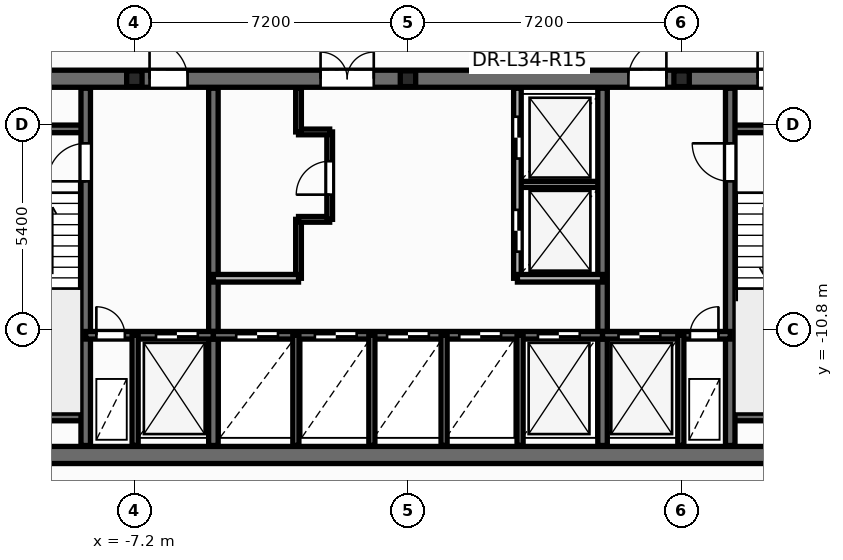
"""IFC4 building model, lengths in metres.
Left out: names, types, materials, properties, quantities, classifications, styles, units other than length and angle.
Written with IfcOpenShell. Run it as: python <this file> out.ifc"""

import sys

from ifc_helpers import new_model, si_unit, direction, frame, frame_2d, origin, origin_2d, place, context, subcontext, project, spatial, rectangle, i_section, extrude, element, fill, save


model = new_model("IFC4")
c1 = context("Model", 3, precision=1e-05, world=origin(), true_north=direction((0.0, 1.0)))
c2 = subcontext(c1, "Body", "Model", "MODEL_VIEW")
j1 = project(units=[si_unit("LENGTHUNIT", "METRE"), si_unit("PLANEANGLEUNIT", "RADIAN")], contexts=[c1])
p1 = place(None, origin())
s1 = spatial("IfcSite", under=j1, at=p1, CompositionType="ELEMENT")
p2 = place(p1, origin())
s2 = spatial("IfcBuilding", under=s1, at=p2, CompositionType="ELEMENT")
p3 = place(p2, frame((0.0, 0.0, 132.9)))
s3 = spatial("IfcBuildingStorey", under=s2, at=p3, CompositionType="ELEMENT", Elevation=132.9)
for number, where, z_axis, x_axis in (
    (1, (-7.2, -4.2, 0.0), (0.0, 0.0, 1.0), (1.0, 0.0, 0.0)),
    (2, (0.0, -4.2, 0.0), (0.0, 0.0, 1.0), (1.0, 0.0, 0.0)),
    (3, (7.2, -4.2, 0.0), (0.0, 0.0, 1.0), (1.0, 0.0, 0.0)),
):
    element("IfcColumn", number, at=place(p3, frame(where, z_axis=z_axis, x_axis=x_axis)), inside=s3, PredefinedType="PILASTER", context=c2, shape_type="SweptSolid", body=[
        extrude(i_section(OverallWidth=0.405, OverallDepth=0.414, WebThickness=0.022, FlangeThickness=0.032, at=origin_2d()), origin(), (0.0, 0.0, 1.0), 3.6),
    ])
p4 = place(p3, frame((-2.88, -9.45, 0.0), z_axis=(0.0, 0.0, 1.0), x_axis=(0.0, 1.0, 0.0)))
e4 = element("IfcWall", 4, at=p4, inside=s3, PredefinedType="PARTITIONING", context=c2, shape_type="SweptSolid", body=[
    extrude(rectangle(XDim=1.55, YDim=0.15, at=frame_2d((0.775, 0.0))), origin(), (0.0, 0.0, 1.0), 3.35),
])
p5 = place(p3, frame((-2.88, -7.9, 0.0), z_axis=(0.0, 0.0, 1.0), x_axis=(1.0, 0.0, 0.0)))
e5 = element("IfcWall", 5, at=p5, inside=s3, PredefinedType="PARTITIONING", context=c2, shape_type="SweptSolid", body=[
    extrude(rectangle(XDim=0.82, YDim=0.15, at=frame_2d((0.41, 0.0))), origin(), (0.0, 0.0, 1.0), 3.35),
])
p6 = place(p3, frame((-2.06, -7.9, 0.0), z_axis=(0.0, 0.0, 1.0), x_axis=(0.0, 1.0, 0.0)))
e6 = element("IfcWall", 6, at=p6, inside=s3, PredefinedType="PARTITIONING", context=c2, shape_type="SweptSolid", body=[
    extrude(rectangle(XDim=2.3, YDim=0.15, at=frame_2d((1.15, 0.0))), origin(), (0.0, 0.0, 1.0), 3.35),
])
p7 = place(p6, frame((0.65, 0.0, 0.0)))
e7 = element("IfcOpeningElement", 7, at=p7, cuts=e6, PredefinedType="OPENING", context=c2, shape_type="SweptSolid", body=[
    extrude(rectangle(XDim=0.886, YDim=2.104, at=frame_2d((0.44, 1.052))), frame((0.0, 0.085, 0.0), z_axis=(0.0, -1.0, 0.0), x_axis=(1.0, 0.0, 0.0)), (0.0, 0.0, 1.0), 0.17),
])
p8 = place(p3, frame((-2.88, -5.6, 0.0), z_axis=(0.0, 0.0, 1.0), x_axis=(1.0, 0.0, 0.0)))
e8 = element("IfcWall", 8, at=p8, inside=s3, PredefinedType="PARTITIONING", context=c2, shape_type="SweptSolid", body=[
    extrude(rectangle(XDim=0.82, YDim=0.15, at=frame_2d((0.41, 0.0))), origin(), (0.0, 0.0, 1.0), 3.35),
])
p9 = place(p3, frame((-2.88, -5.6, 0.0), z_axis=(0.0, 0.0, 1.0), x_axis=(0.0, 1.0, 0.0)))
e9 = element("IfcWall", 9, at=p9, inside=s3, PredefinedType="PARTITIONING", context=c2, shape_type="SweptSolid", body=[
    extrude(rectangle(XDim=1.15, YDim=0.15, at=frame_2d((0.575, 0.0))), origin(), (0.0, 0.0, 1.0), 3.35),
])
p10 = place(p3, frame((2.88, -6.98, 0.0), z_axis=(0.0, 0.0, 1.0), x_axis=(1.0, 0.0, 0.0)))
e10 = element("IfcWall", 10, at=p10, inside=s3, PredefinedType="PARTITIONING", context=c2, shape_type="SweptSolid", body=[
    extrude(rectangle(XDim=2.24, YDim=0.16, at=frame_2d((1.12, 0.0))), origin(), (0.0, 0.0, 1.0), 3.35),
])
p11 = place(p3, frame((-12.65, -14.1, 0.0), z_axis=(0.0, 0.0, 1.0), x_axis=(1.0, 0.0, 0.0)))
e11 = element("IfcWall", 11, at=p11, inside=s3, PredefinedType="SHEAR", context=c2, shape_type="SweptSolid", body=[
    extrude(rectangle(XDim=25.3, YDim=0.45, at=frame_2d((12.65, 0.0))), origin(), (0.0, 0.0, 1.0), 3.6),
])
p12 = place(p3, frame((-12.65, -4.2, 0.0), z_axis=(0.0, 0.0, 1.0), x_axis=(1.0, 0.0, 0.0)))
e12 = element("IfcWall", 12, at=p12, inside=s3, PredefinedType="SHEAR", context=c2, shape_type="SweptSolid", body=[
    extrude(rectangle(XDim=25.3, YDim=0.45, at=frame_2d((12.65, 0.0))), origin(), (0.0, 0.0, 1.0), 3.6),
])
p13 = place(p12, frame((1.85, 0.0, 0.0)))
e13 = element("IfcOpeningElement", 13, at=p13, cuts=e12, PredefinedType="OPENING", context=c2, shape_type="SweptSolid", body=[
    extrude(rectangle(XDim=0.756, YDim=2.054, at=frame_2d((0.375, 1.027))), frame((0.0, 0.235, 0.0), z_axis=(0.0, -1.0, 0.0), x_axis=(1.0, 0.0, 0.0)), (0.0, 0.0, 1.0), 0.47),
])
p14 = place(p12, frame((21.85, 0.0, 0.0)))
e14 = element("IfcOpeningElement", 14, at=p14, cuts=e12, PredefinedType="OPENING", context=c2, shape_type="SweptSolid", body=[
    extrude(rectangle(XDim=0.756, YDim=2.054, at=frame_2d((0.375, 1.027))), frame((0.0, 0.235, 0.0), z_axis=(0.0, -1.0, 0.0), x_axis=(1.0, 0.0, 0.0)), (0.0, 0.0, 1.0), 0.47),
])
p15 = place(p12, frame((23.5, 0.0, 0.0)))
e15 = element("IfcOpeningElement", 15, at=p15, cuts=e12, PredefinedType="OPENING", context=c2, shape_type="SweptSolid", body=[
    extrude(rectangle(XDim=0.756, YDim=2.054, at=frame_2d((0.375, 1.027))), frame((0.0, 0.235, 0.0), z_axis=(0.0, -1.0, 0.0), x_axis=(1.0, 0.0, 0.0)), (0.0, 0.0, 1.0), 0.47),
])
p16 = place(p12, frame((5.85, 0.0, 0.0)))
e16 = element("IfcOpeningElement", 16, at=p16, cuts=e12, PredefinedType="OPENING", context=c2, shape_type="SweptSolid", body=[
    extrude(rectangle(XDim=1.006, YDim=2.104, at=frame_2d((0.5, 1.052))), frame((0.0, 0.235, 0.0), z_axis=(0.0, -1.0, 0.0), x_axis=(1.0, 0.0, 0.0)), (0.0, 0.0, 1.0), 0.47),
])
p17 = place(p12, frame((10.35, 0.0, 0.0)))
e17 = element("IfcOpeningElement", 17, at=p17, cuts=e12, PredefinedType="OPENING", context=c2, shape_type="SweptSolid", body=[
    extrude(rectangle(XDim=1.406, YDim=2.154, at=frame_2d((0.7, 1.077))), frame((0.0, 0.235, 0.0), z_axis=(0.0, -1.0, 0.0), x_axis=(1.0, 0.0, 0.0)), (0.0, 0.0, 1.0), 0.47),
])
p18 = place(p12, frame((18.45, 0.0, 0.0)))
e18 = element("IfcOpeningElement", 18, at=p18, cuts=e12, PredefinedType="OPENING", context=c2, shape_type="SweptSolid", body=[
    extrude(rectangle(XDim=1.006, YDim=2.104, at=frame_2d((0.5, 1.052))), frame((0.0, 0.235, 0.0), z_axis=(0.0, -1.0, 0.0), x_axis=(1.0, 0.0, 0.0)), (0.0, 0.0, 1.0), 0.47),
])
for number, where, z_axis, x_axis in (
    (19, (-12.35, -5.52, 0.0), (0.0, 0.0, 1.0), (1.0, 0.0, 0.0)),
    (20, (-12.35, -13.1, 0.0), (0.0, 0.0, 1.0), (1.0, 0.0, 0.0)),
    (21, (8.48, -5.52, 0.0), (0.0, 0.0, 1.0), (1.0, 0.0, 0.0)),
    (22, (8.48, -13.1, 0.0), (0.0, 0.0, 1.0), (1.0, 0.0, 0.0)),
):
    element("IfcWall", number, at=place(p3, frame(where, z_axis=z_axis, x_axis=x_axis)), inside=s3, PredefinedType="SOLIDWALL", context=c2, shape_type="SweptSolid", body=[
        extrude(rectangle(XDim=3.87, YDim=0.2, at=frame_2d((1.935, 0.0))), origin(), (0.0, 0.0, 1.0), 3.6),
    ])
p19 = place(p3, frame((-8.48, -13.85, 0.0), z_axis=(0.0, 0.0, 1.0), x_axis=(0.0, 1.0, 0.0)))
e23 = element("IfcWall", 23, at=p19, inside=s3, PredefinedType="SHEAR", context=c2, shape_type="SweptSolid", body=[
    extrude(rectangle(XDim=9.4, YDim=0.25, at=frame_2d((4.7, 0.0))), origin(), (0.0, 0.0, 1.0), 3.6),
])
p20 = place(p19, frame((6.95, 0.0, 0.0)))
e24 = element("IfcOpeningElement", 24, at=p20, cuts=e23, PredefinedType="OPENING", context=c2, shape_type="SweptSolid", body=[
    extrude(rectangle(XDim=1.006, YDim=2.104, at=frame_2d((0.5, 1.052))), frame((0.0, 0.135, 0.0), z_axis=(0.0, -1.0, 0.0), x_axis=(1.0, 0.0, 0.0)), (0.0, 0.0, 1.0), 0.27),
])
p21 = place(p3, frame((8.48, -13.85, 0.0), z_axis=(0.0, 0.0, 1.0), x_axis=(0.0, 1.0, 0.0)))
e25 = element("IfcWall", 25, at=p21, inside=s3, PredefinedType="SHEAR", context=c2, shape_type="SweptSolid", body=[
    extrude(rectangle(XDim=9.4, YDim=0.25, at=frame_2d((4.7, 0.0))), origin(), (0.0, 0.0, 1.0), 3.6),
])
p22 = place(p21, frame((6.95, 0.0, 0.0)))
e26 = element("IfcOpeningElement", 26, at=p22, cuts=e25, PredefinedType="OPENING", context=c2, shape_type="SweptSolid", body=[
    extrude(rectangle(XDim=1.006, YDim=2.104, at=frame_2d((0.5, 1.052))), frame((0.0, 0.135, 0.0), z_axis=(0.0, -1.0, 0.0), x_axis=(1.0, 0.0, 0.0)), (0.0, 0.0, 1.0), 0.27),
])
for number, where, z_axis, x_axis in (
    (27, (-5.12, -13.85, 0.0), (0.0, 0.0, 1.0), (0.0, 1.0, 0.0)),
    (28, (5.12, -13.85, 0.0), (0.0, 0.0, 1.0), (0.0, 1.0, 0.0)),
):
    element("IfcWall", number, at=place(p3, frame(where, z_axis=z_axis, x_axis=x_axis)), inside=s3, PredefinedType="SHEAR", context=c2, shape_type="SweptSolid", body=[
        extrude(rectangle(XDim=9.4, YDim=0.25, at=frame_2d((4.7, 0.0))), origin(), (0.0, 0.0, 1.0), 3.6),
    ])
p23 = place(p3, frame((-8.48, -10.95, 0.0), z_axis=(0.0, 0.0, 1.0), x_axis=(1.0, 0.0, 0.0)))
e29 = element("IfcWall", 29, at=p23, inside=s3, PredefinedType="SOLIDWALL", context=c2, shape_type="SweptSolid", body=[
    extrude(rectangle(XDim=3.36, YDim=0.2, at=frame_2d((1.68, 0.0))), origin(), (0.0, 0.0, 1.0), 3.6),
])
p24 = place(p23, frame((0.28, 0.0, 0.0)))
e30 = element("IfcOpeningElement", 30, at=p24, cuts=e29, PredefinedType="OPENING", context=c2, shape_type="SweptSolid", body=[
    extrude(rectangle(XDim=0.756, YDim=2.054, at=frame_2d((0.375, 1.027))), frame((0.0, 0.11, 0.0), z_axis=(0.0, -1.0, 0.0), x_axis=(1.0, 0.0, 0.0)), (0.0, 0.0, 1.0), 0.22),
])
p25 = place(p23, frame((1.85, 0.0, 0.0)))
e31 = element("IfcOpeningElement", 31, at=p25, cuts=e29, PredefinedType="OPENING", context=c2, shape_type="SweptSolid", body=[
    extrude(rectangle(XDim=1.106, YDim=2.104, at=frame_2d((0.55, 1.052))), frame((0.0, 0.11, 0.0), z_axis=(0.0, -1.0, 0.0), x_axis=(1.0, 0.0, 0.0)), (0.0, 0.0, 1.0), 0.22),
])
p26 = place(p3, frame((-5.12, -10.95, 0.0), z_axis=(0.0, 0.0, 1.0), x_axis=(1.0, 0.0, 0.0)))
e32 = element("IfcWall", 32, at=p26, inside=s3, PredefinedType="SOLIDWALL", context=c2, shape_type="SweptSolid", body=[
    extrude(rectangle(XDim=10.24, YDim=0.2, at=frame_2d((5.12, 0.0))), origin(), (0.0, 0.0, 1.0), 3.6),
])
p27 = place(p26, frame((0.6, 0.0, 0.0)))
e33 = element("IfcOpeningElement", 33, at=p27, cuts=e32, PredefinedType="OPENING", context=c2, shape_type="SweptSolid", body=[
    extrude(rectangle(XDim=1.106, YDim=2.104, at=frame_2d((0.55, 1.052))), frame((0.0, 0.11, 0.0), z_axis=(0.0, -1.0, 0.0), x_axis=(1.0, 0.0, 0.0)), (0.0, 0.0, 1.0), 0.22),
])
p28 = place(p26, frame((2.67, 0.0, 0.0)))
e34 = element("IfcOpeningElement", 34, at=p28, cuts=e32, PredefinedType="OPENING", context=c2, shape_type="SweptSolid", body=[
    extrude(rectangle(XDim=1.106, YDim=2.104, at=frame_2d((0.55, 1.052))), frame((0.0, 0.11, 0.0), z_axis=(0.0, -1.0, 0.0), x_axis=(1.0, 0.0, 0.0)), (0.0, 0.0, 1.0), 0.22),
])
p29 = place(p26, frame((4.57, 0.0, 0.0)))
e35 = element("IfcOpeningElement", 35, at=p29, cuts=e32, PredefinedType="OPENING", context=c2, shape_type="SweptSolid", body=[
    extrude(rectangle(XDim=1.106, YDim=2.104, at=frame_2d((0.55, 1.052))), frame((0.0, 0.11, 0.0), z_axis=(0.0, -1.0, 0.0), x_axis=(1.0, 0.0, 0.0)), (0.0, 0.0, 1.0), 0.22),
])
p30 = place(p26, frame((6.47, 0.0, 0.0)))
e36 = element("IfcOpeningElement", 36, at=p30, cuts=e32, PredefinedType="OPENING", context=c2, shape_type="SweptSolid", body=[
    extrude(rectangle(XDim=1.106, YDim=2.104, at=frame_2d((0.55, 1.052))), frame((0.0, 0.11, 0.0), z_axis=(0.0, -1.0, 0.0), x_axis=(1.0, 0.0, 0.0)), (0.0, 0.0, 1.0), 0.22),
])
p31 = place(p26, frame((8.54, 0.0, 0.0)))
e37 = element("IfcOpeningElement", 37, at=p31, cuts=e32, PredefinedType="OPENING", context=c2, shape_type="SweptSolid", body=[
    extrude(rectangle(XDim=1.106, YDim=2.104, at=frame_2d((0.55, 1.052))), frame((0.0, 0.11, 0.0), z_axis=(0.0, -1.0, 0.0), x_axis=(1.0, 0.0, 0.0)), (0.0, 0.0, 1.0), 0.22),
])
p32 = place(p3, frame((5.12, -10.95, 0.0), z_axis=(0.0, 0.0, 1.0), x_axis=(1.0, 0.0, 0.0)))
e38 = element("IfcWall", 38, at=p32, inside=s3, PredefinedType="SOLIDWALL", context=c2, shape_type="SweptSolid", body=[
    extrude(rectangle(XDim=3.36, YDim=0.2, at=frame_2d((1.68, 0.0))), origin(), (0.0, 0.0, 1.0), 3.6),
])
p33 = place(p32, frame((0.42, 0.0, 0.0)))
e39 = element("IfcOpeningElement", 39, at=p33, cuts=e38, PredefinedType="OPENING", context=c2, shape_type="SweptSolid", body=[
    extrude(rectangle(XDim=1.106, YDim=2.104, at=frame_2d((0.55, 1.052))), frame((0.0, 0.11, 0.0), z_axis=(0.0, -1.0, 0.0), x_axis=(1.0, 0.0, 0.0)), (0.0, 0.0, 1.0), 0.22),
])
p34 = place(p32, frame((2.3, 0.0, 0.0)))
e40 = element("IfcOpeningElement", 40, at=p34, cuts=e38, PredefinedType="OPENING", context=c2, shape_type="SweptSolid", body=[
    extrude(rectangle(XDim=0.756, YDim=2.054, at=frame_2d((0.375, 1.027))), frame((0.0, 0.11, 0.0), z_axis=(0.0, -1.0, 0.0), x_axis=(1.0, 0.0, 0.0)), (0.0, 0.0, 1.0), 0.22),
])
for number, where, z_axis, x_axis in (
    (41, (-7.18, -13.85, 0.0), (0.0, 0.0, 1.0), (0.0, 1.0, 0.0)),
    (42, (7.18, -13.85, 0.0), (0.0, 0.0, 1.0), (0.0, 1.0, 0.0)),
    (43, (-2.95, -13.85, 0.0), (0.0, 0.0, 1.0), (0.0, 1.0, 0.0)),
    (44, (2.95, -13.85, 0.0), (0.0, 0.0, 1.0), (0.0, 1.0, 0.0)),
):
    element("IfcWall", number, at=place(p3, frame(where, z_axis=z_axis, x_axis=x_axis)), inside=s3, PredefinedType="PARTITIONING", context=c2, shape_type="SweptSolid", body=[
        extrude(rectangle(XDim=2.9, YDim=0.16, at=frame_2d((1.45, 0.0))), origin(), (0.0, 0.0, 1.0), 2.475),
    ])
p35 = place(p3, frame((-5.12, -9.45, 0.0), z_axis=(0.0, 0.0, 1.0), x_axis=(1.0, 0.0, 0.0)))
e45 = element("IfcWall", 45, at=p35, inside=s3, PredefinedType="SOLIDWALL", context=c2, shape_type="SweptSolid", body=[
    extrude(rectangle(XDim=2.24, YDim=0.2, at=frame_2d((1.12, 0.0))), origin(), (0.0, 0.0, 1.0), 3.35),
])
p36 = place(p3, frame((2.88, -9.45, 0.0), z_axis=(0.0, 0.0, 1.0), x_axis=(0.0, 1.0, 0.0)))
e46 = element("IfcWall", 46, at=p36, inside=s3, PredefinedType="SOLIDWALL", context=c2, shape_type="SweptSolid", body=[
    extrude(rectangle(XDim=5.0, YDim=0.2, at=frame_2d((2.5, 0.0))), origin(), (0.0, 0.0, 1.0), 3.35),
])
p37 = place(p36, frame((0.7, 0.0, 0.0)))
e47 = element("IfcOpeningElement", 47, at=p37, cuts=e46, PredefinedType="OPENING", context=c2, shape_type="SweptSolid", body=[
    extrude(rectangle(XDim=1.106, YDim=2.104, at=frame_2d((0.55, 1.052))), frame((0.0, 0.11, 0.0), z_axis=(0.0, -1.0, 0.0), x_axis=(1.0, 0.0, 0.0)), (0.0, 0.0, 1.0), 0.22),
])
p38 = place(p36, frame((3.15, 0.0, 0.0)))
e48 = element("IfcOpeningElement", 48, at=p38, cuts=e46, PredefinedType="OPENING", context=c2, shape_type="SweptSolid", body=[
    extrude(rectangle(XDim=1.106, YDim=2.104, at=frame_2d((0.55, 1.052))), frame((0.0, 0.11, 0.0), z_axis=(0.0, -1.0, 0.0), x_axis=(1.0, 0.0, 0.0)), (0.0, 0.0, 1.0), 0.22),
])
p39 = place(p3, frame((2.88, -9.45, 0.0), z_axis=(0.0, 0.0, 1.0), x_axis=(1.0, 0.0, 0.0)))
e49 = element("IfcWall", 49, at=p39, inside=s3, PredefinedType="SOLIDWALL", context=c2, shape_type="SweptSolid", body=[
    extrude(rectangle(XDim=2.24, YDim=0.2, at=frame_2d((1.12, 0.0))), origin(), (0.0, 0.0, 1.0), 3.35),
])
for number, where, z_axis, x_axis in (
    (50, (-0.95, -13.85, 0.0), (0.0, 0.0, 1.0), (0.0, 1.0, 0.0)),
    (51, (0.95, -13.85, 0.0), (0.0, 0.0, 1.0), (0.0, 1.0, 0.0)),
):
    element("IfcWall", number, at=place(p3, frame(where, z_axis=z_axis, x_axis=x_axis)), inside=s3, PredefinedType="PARTITIONING", context=c2, shape_type="SweptSolid", body=[
        extrude(rectangle(XDim=2.9, YDim=0.16, at=frame_2d((1.45, 0.0))), origin(), (0.0, 0.0, 1.0), 2.475),
    ])
p40 = place(p7, origin())
e52 = element("IfcDoor", 52, at=p40, inside=s3, OperationType="SINGLE_SWING_LEFT", PredefinedType="DOOR", context=c2, shape_type="SweptSolid", body=[
    extrude(rectangle(XDim=0.88, YDim=2.1, at=frame_2d((0.44, 1.05))), frame((0.0, 0.025, 0.0), z_axis=(0.0, -1.0, 0.0), x_axis=(1.0, 0.0, 0.0)), (0.0, 0.0, 1.0), 0.05),
])
fill(e7, e52)
p41 = place(p37, origin())
e53 = element("IfcDoor", 53, at=p41, inside=s3, OperationType="DOUBLE_DOOR_SLIDING", PredefinedType="DOOR", context=c2, shape_type="SweptSolid", body=[
    extrude(rectangle(XDim=1.1, YDim=2.1, at=frame_2d((0.55, 1.05))), frame((0.0, 0.025, 0.0), z_axis=(0.0, -1.0, 0.0), x_axis=(1.0, 0.0, 0.0)), (0.0, 0.0, 1.0), 0.05),
])
fill(e47, e53)
p42 = place(p38, origin())
e54 = element("IfcDoor", 54, at=p42, inside=s3, OperationType="DOUBLE_DOOR_SLIDING", PredefinedType="DOOR", context=c2, shape_type="SweptSolid", body=[
    extrude(rectangle(XDim=1.1, YDim=2.1, at=frame_2d((0.55, 1.05))), frame((0.0, 0.025, 0.0), z_axis=(0.0, -1.0, 0.0), x_axis=(1.0, 0.0, 0.0)), (0.0, 0.0, 1.0), 0.05),
])
fill(e48, e54)
p43 = place(p20, origin())
e55 = element("IfcDoor", 55, at=p43, inside=s3, OperationType="SINGLE_SWING_LEFT", PredefinedType="DOOR", context=c2, shape_type="SweptSolid", body=[
    extrude(rectangle(XDim=1.0, YDim=2.1, at=frame_2d((0.5, 1.05))), frame((0.0, 0.025, 0.0), z_axis=(0.0, -1.0, 0.0), x_axis=(1.0, 0.0, 0.0)), (0.0, 0.0, 1.0), 0.05),
])
fill(e24, e55)
p44 = place(p22, origin())
e56 = element("IfcDoor", 56, at=p44, inside=s3, OperationType="SINGLE_SWING_RIGHT", PredefinedType="DOOR", context=c2, shape_type="SweptSolid", body=[
    extrude(rectangle(XDim=1.0, YDim=2.1, at=frame_2d((0.5, 1.05))), frame((0.0, 0.025, 0.0), z_axis=(0.0, -1.0, 0.0), x_axis=(1.0, 0.0, 0.0)), (0.0, 0.0, 1.0), 0.05),
])
fill(e26, e56)
p45 = place(p24, origin())
e57 = element("IfcDoor", 57, at=p45, inside=s3, OperationType="SINGLE_SWING_LEFT", PredefinedType="DOOR", context=c2, shape_type="SweptSolid", body=[
    extrude(rectangle(XDim=0.75, YDim=2.05, at=frame_2d((0.375, 1.025))), frame((0.0, 0.025, 0.0), z_axis=(0.0, -1.0, 0.0), x_axis=(1.0, 0.0, 0.0)), (0.0, 0.0, 1.0), 0.05),
])
fill(e30, e57)
p46 = place(p25, origin())
e58 = element("IfcDoor", 58, at=p46, inside=s3, OperationType="DOUBLE_DOOR_SLIDING", PredefinedType="DOOR", context=c2, shape_type="SweptSolid", body=[
    extrude(rectangle(XDim=1.1, YDim=2.1, at=frame_2d((0.55, 1.05))), frame((0.0, 0.025, 0.0), z_axis=(0.0, -1.0, 0.0), x_axis=(1.0, 0.0, 0.0)), (0.0, 0.0, 1.0), 0.05),
])
fill(e31, e58)
p47 = place(p33, origin())
e59 = element("IfcDoor", 59, at=p47, inside=s3, OperationType="DOUBLE_DOOR_SLIDING", PredefinedType="DOOR", context=c2, shape_type="SweptSolid", body=[
    extrude(rectangle(XDim=1.1, YDim=2.1, at=frame_2d((0.55, 1.05))), frame((0.0, 0.025, 0.0), z_axis=(0.0, -1.0, 0.0), x_axis=(1.0, 0.0, 0.0)), (0.0, 0.0, 1.0), 0.05),
])
fill(e39, e59)
p48 = place(p34, origin())
e60 = element("IfcDoor", 60, at=p48, inside=s3, OperationType="SINGLE_SWING_RIGHT", PredefinedType="DOOR", context=c2, shape_type="SweptSolid", body=[
    extrude(rectangle(XDim=0.75, YDim=2.05, at=frame_2d((0.375, 1.025))), frame((0.0, 0.025, 0.0), z_axis=(0.0, -1.0, 0.0), x_axis=(1.0, 0.0, 0.0)), (0.0, 0.0, 1.0), 0.05),
])
fill(e40, e60)
p49 = place(p27, origin())
e61 = element("IfcDoor", 61, at=p49, inside=s3, OperationType="DOUBLE_DOOR_SLIDING", PredefinedType="DOOR", context=c2, shape_type="SweptSolid", body=[
    extrude(rectangle(XDim=1.1, YDim=2.1, at=frame_2d((0.55, 1.05))), frame((0.0, 0.025, 0.0), z_axis=(0.0, -1.0, 0.0), x_axis=(1.0, 0.0, 0.0)), (0.0, 0.0, 1.0), 0.05),
])
fill(e33, e61)
p50 = place(p28, origin())
e62 = element("IfcDoor", 62, at=p50, inside=s3, OperationType="DOUBLE_DOOR_SLIDING", PredefinedType="DOOR", context=c2, shape_type="SweptSolid", body=[
    extrude(rectangle(XDim=1.1, YDim=2.1, at=frame_2d((0.55, 1.05))), frame((0.0, 0.025, 0.0), z_axis=(0.0, -1.0, 0.0), x_axis=(1.0, 0.0, 0.0)), (0.0, 0.0, 1.0), 0.05),
])
fill(e34, e62)
p51 = place(p29, origin())
e63 = element("IfcDoor", 63, at=p51, inside=s3, OperationType="DOUBLE_DOOR_SLIDING", PredefinedType="DOOR", context=c2, shape_type="SweptSolid", body=[
    extrude(rectangle(XDim=1.1, YDim=2.1, at=frame_2d((0.55, 1.05))), frame((0.0, 0.025, 0.0), z_axis=(0.0, -1.0, 0.0), x_axis=(1.0, 0.0, 0.0)), (0.0, 0.0, 1.0), 0.05),
])
fill(e35, e63)
p52 = place(p30, origin())
e64 = element("IfcDoor", 64, at=p52, inside=s3, OperationType="DOUBLE_DOOR_SLIDING", PredefinedType="DOOR", context=c2, shape_type="SweptSolid", body=[
    extrude(rectangle(XDim=1.1, YDim=2.1, at=frame_2d((0.55, 1.05))), frame((0.0, 0.025, 0.0), z_axis=(0.0, -1.0, 0.0), x_axis=(1.0, 0.0, 0.0)), (0.0, 0.0, 1.0), 0.05),
])
fill(e36, e64)
p53 = place(p31, origin())
e65 = element("IfcDoor", 65, at=p53, inside=s3, OperationType="DOUBLE_DOOR_SLIDING", PredefinedType="DOOR", context=c2, shape_type="SweptSolid", body=[
    extrude(rectangle(XDim=1.1, YDim=2.1, at=frame_2d((0.55, 1.05))), frame((0.0, 0.025, 0.0), z_axis=(0.0, -1.0, 0.0), x_axis=(1.0, 0.0, 0.0)), (0.0, 0.0, 1.0), 0.05),
])
fill(e37, e65)
p54 = place(p14, origin())
e66 = element("IfcDoor", 66, at=p54, inside=s3, OperationType="SINGLE_SWING_LEFT", PredefinedType="DOOR", context=c2, shape_type="SweptSolid", body=[
    extrude(rectangle(XDim=0.75, YDim=2.05, at=frame_2d((0.375, 1.025))), frame((0.0, 0.025, 0.0), z_axis=(0.0, -1.0, 0.0), x_axis=(1.0, 0.0, 0.0)), (0.0, 0.0, 1.0), 0.05),
])
fill(e14, e66)
p55 = place(p16, origin())
e67 = element("IfcDoor", 67, at=p55, inside=s3, OperationType="SINGLE_SWING_LEFT", PredefinedType="DOOR", context=c2, shape_type="SweptSolid", body=[
    extrude(rectangle(XDim=1.0, YDim=2.1, at=frame_2d((0.5, 1.05))), frame((0.0, 0.025, 0.0), z_axis=(0.0, -1.0, 0.0), x_axis=(1.0, 0.0, 0.0)), (0.0, 0.0, 1.0), 0.05),
])
fill(e16, e67)
p56 = place(p17, origin())
e68 = element("IfcDoor", 68, at=p56, inside=s3, OperationType="DOUBLE_DOOR_SINGLE_SWING", PredefinedType="DOOR", context=c2, shape_type="SweptSolid", body=[
    extrude(rectangle(XDim=1.4, YDim=2.15, at=frame_2d((0.7, 1.075))), frame((0.0, 0.025, 0.0), z_axis=(0.0, -1.0, 0.0), x_axis=(1.0, 0.0, 0.0)), (0.0, 0.0, 1.0), 0.05),
])
fill(e17, e68)
p57 = place(p18, origin())
e69 = element("IfcDoor", 69, at=p57, inside=s3, OperationType="SINGLE_SWING_RIGHT", PredefinedType="DOOR", context=c2, shape_type="SweptSolid", body=[
    extrude(rectangle(XDim=1.0, YDim=2.1, at=frame_2d((0.5, 1.05))), frame((0.0, 0.025, 0.0), z_axis=(0.0, -1.0, 0.0), x_axis=(1.0, 0.0, 0.0)), (0.0, 0.0, 1.0), 0.05),
])
fill(e18, e69)
save(model, sys.argv[1])
